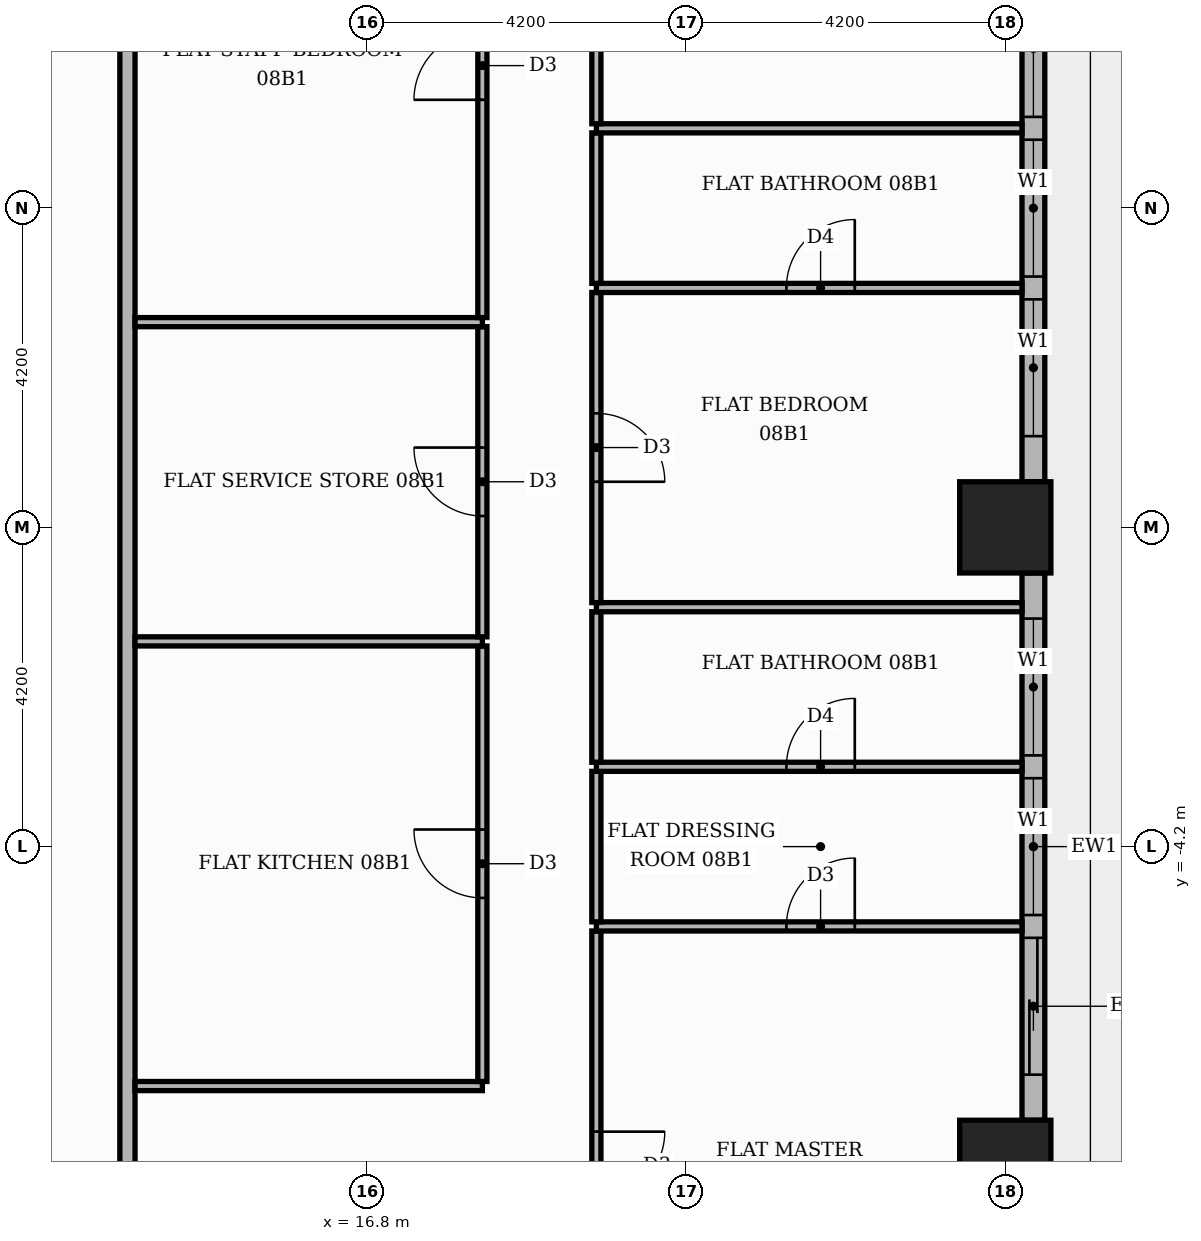
"""IFC4 building model, lengths in metres.
Left out: names, types, materials, properties, quantities, classifications, styles, units other than length and angle.
Written with IfcOpenShell. Run it as: python <this file> out.ifc"""

import sys

from ifc_helpers import new_model, si_unit, direction, frame, frame_2d, origin, origin_2d, place, context, subcontext, project, spatial, rectangle, extrude, element, fill, save


model = new_model("IFC4")
c1 = context("Model", 3, precision=1e-05, world=origin(), true_north=direction((0.0, 1.0)))
c2 = subcontext(c1, "Body", "Model", "MODEL_VIEW")
j1 = project(units=[si_unit("LENGTHUNIT", "METRE"), si_unit("PLANEANGLEUNIT", "RADIAN")], contexts=[c1])
p1 = place(None, origin())
s1 = spatial("IfcSite", under=j1, at=p1, CompositionType="ELEMENT")
p2 = place(p1, origin())
s2 = spatial("IfcBuilding", under=s1, at=p2, CompositionType="ELEMENT")
p3 = place(p2, frame((0.0, 0.0, 38.7)))
s3 = spatial("IfcBuildingStorey", under=s2, at=p3, CompositionType="ELEMENT", Elevation=38.7)
for number, where, z_axis, x_axis in (
    (1, (25.2, 0.0, 0.0), (0.0, 0.0, 1.0), (1.0, 0.0, 0.0)),
    (2, (25.2, -8.4, 0.0), (0.0, 0.0, 1.0), (1.0, 0.0, 0.0)),
):
    element("IfcColumn", number, at=place(p3, frame(where, z_axis=z_axis, x_axis=x_axis)), inside=s3, PredefinedType="COLUMN", context=c2, shape_type="SweptSolid", body=[
        extrude(rectangle(XDim=1.2, YDim=1.2, at=origin_2d()), origin(), (0.0, 0.0, 1.0), 3.9),
    ])
p4 = place(p3, frame((25.57, -7.8, 0.0), z_axis=(0.0, 0.0, 1.0), x_axis=(0.0, 1.0, 0.0)))
e3 = element("IfcWall", 3, at=p4, inside=s3, PredefinedType="STANDARD", context=c2, shape_type="SweptSolid", body=[
    extrude(rectangle(XDim=7.2, YDim=0.3, at=frame_2d((3.6, 0.0))), origin(), (0.0, 0.0, 1.0), 3.48),
])
p5 = place(p4, frame((0.6, 0.0, 0.0)))
e4 = element("IfcOpeningElement", 4, at=p5, cuts=e3, PredefinedType="OPENING", context=c2, shape_type="SweptSolid", body=[
    extrude(rectangle(XDim=1.8, YDim=2.4, at=frame_2d((0.9, 1.2))), frame((0.0, 0.16, 0.0), z_axis=(0.0, -1.0, 0.0), x_axis=(1.0, 0.0, 0.0)), (0.0, 0.0, 1.0), 0.32),
])
p6 = place(p4, frame((2.7, 0.0, 0.9)))
e5 = element("IfcOpeningElement", 5, at=p6, cuts=e3, PredefinedType="OPENING", context=c2, shape_type="SweptSolid", body=[
    extrude(rectangle(XDim=1.8, YDim=2.1, at=frame_2d((0.9, 1.05))), frame((0.0, 0.16, 0.0), z_axis=(0.0, -1.0, 0.0), x_axis=(1.0, 0.0, 0.0)), (0.0, 0.0, 1.0), 0.32),
])
p7 = place(p4, frame((4.8, 0.0, 0.9)))
e6 = element("IfcOpeningElement", 6, at=p7, cuts=e3, PredefinedType="OPENING", context=c2, shape_type="SweptSolid", body=[
    extrude(rectangle(XDim=1.8, YDim=2.1, at=frame_2d((0.9, 1.05))), frame((0.0, 0.16, 0.0), z_axis=(0.0, -1.0, 0.0), x_axis=(1.0, 0.0, 0.0)), (0.0, 0.0, 1.0), 0.32),
])
p8 = place(p3, frame((25.57, 0.6, 0.0), z_axis=(0.0, 0.0, 1.0), x_axis=(0.0, 1.0, 0.0)))
e7 = element("IfcWall", 7, at=p8, inside=s3, PredefinedType="STANDARD", context=c2, shape_type="SweptSolid", body=[
    extrude(rectangle(XDim=7.2, YDim=0.3, at=frame_2d((3.6, 0.0))), origin(), (0.0, 0.0, 1.0), 3.48),
])
p9 = place(p8, frame((0.6, 0.0, 0.9)))
e8 = element("IfcOpeningElement", 8, at=p9, cuts=e7, PredefinedType="OPENING", context=c2, shape_type="SweptSolid", body=[
    extrude(rectangle(XDim=1.8, YDim=2.1, at=frame_2d((0.9, 1.05))), frame((0.0, 0.16, 0.0), z_axis=(0.0, -1.0, 0.0), x_axis=(1.0, 0.0, 0.0)), (0.0, 0.0, 1.0), 0.32),
])
p10 = place(p8, frame((2.7, 0.0, 0.9)))
e9 = element("IfcOpeningElement", 9, at=p10, cuts=e7, PredefinedType="OPENING", context=c2, shape_type="SweptSolid", body=[
    extrude(rectangle(XDim=1.8, YDim=2.1, at=frame_2d((0.9, 1.05))), frame((0.0, 0.16, 0.0), z_axis=(0.0, -1.0, 0.0), x_axis=(1.0, 0.0, 0.0)), (0.0, 0.0, 1.0), 0.32),
])
p11 = place(p8, frame((4.8, 0.0, 0.9)))
e10 = element("IfcOpeningElement", 10, at=p11, cuts=e7, PredefinedType="OPENING", context=c2, shape_type="SweptSolid", body=[
    extrude(rectangle(XDim=1.8, YDim=2.1, at=frame_2d((0.9, 1.05))), frame((0.0, 0.16, 0.0), z_axis=(0.0, -1.0, 0.0), x_axis=(1.0, 0.0, 0.0)), (0.0, 0.0, 1.0), 0.32),
])
p12 = place(p3, frame((13.65, -13.55, 0.0), z_axis=(0.0, 0.0, 1.0), x_axis=(0.0, 1.0, 0.0)))
e11 = element("IfcWall", 11, at=p12, inside=s3, PredefinedType="PARTITIONING", context=c2, shape_type="SweptSolid", body=[
    extrude(rectangle(XDim=27.1, YDim=0.2, at=frame_2d((13.55, 0.0))), origin(), (0.0, 0.0, 1.0), 3.48),
])
p13 = place(p12, frame((2.5, 0.0, 0.0)))
e12 = element("IfcOpeningElement", 12, at=p13, cuts=e11, PredefinedType="OPENING", context=c2, shape_type="SweptSolid", body=[
    extrude(rectangle(XDim=1.1, YDim=2.4, at=frame_2d((0.55, 1.2))), frame((0.0, 0.11, 0.0), z_axis=(0.0, -1.0, 0.0), x_axis=(1.0, 0.0, 0.0)), (0.0, 0.0, 1.0), 0.22),
])
p14 = place(p3, frame((19.82, -11.49, 0.0), z_axis=(0.0, 0.0, 1.0), x_axis=(0.0, 1.0, 0.0)))
e13 = element("IfcWall", 13, at=p14, inside=s3, PredefinedType="PARTITIONING", context=c2, shape_type="SweptSolid", body=[
    extrude(rectangle(XDim=6.18, YDim=0.12, at=frame_2d((3.09, 0.0))), origin(), (0.0, 0.0, 1.0), 3.48),
])
p15 = place(p14, frame((2.64, 0.0, 0.0)))
e14 = element("IfcOpeningElement", 14, at=p15, cuts=e13, PredefinedType="OPENING", context=c2, shape_type="SweptSolid", body=[
    extrude(rectangle(XDim=0.9, YDim=2.1, at=frame_2d((0.45, 1.05))), frame((0.0, 0.07, 0.0), z_axis=(0.0, -1.0, 0.0), x_axis=(1.0, 0.0, 0.0)), (0.0, 0.0, 1.0), 0.14),
])
p16 = place(p3, frame((13.75, -7.35, 0.0), z_axis=(0.0, 0.0, 1.0), x_axis=(1.0, 0.0, 0.0)))
e15 = element("IfcWall", 15, at=p16, inside=s3, PredefinedType="PARTITIONING", context=c2, shape_type="SweptSolid", body=[
    extrude(rectangle(XDim=4.57, YDim=0.12, at=frame_2d((2.285, 0.0))), origin(), (0.0, 0.0, 1.0), 3.48),
])
p17 = place(p3, frame((18.32, -7.29, 0.0), z_axis=(0.0, 0.0, 1.0), x_axis=(0.0, 1.0, 0.0)))
e16 = element("IfcWall", 16, at=p17, inside=s3, PredefinedType="PARTITIONING", context=c2, shape_type="SweptSolid", body=[
    extrude(rectangle(XDim=5.73, YDim=0.12, at=frame_2d((2.865, 0.0))), origin(), (0.0, 0.0, 1.0), 3.48),
])
p18 = place(p17, frame((2.415, 0.0, 0.0)))
e17 = element("IfcOpeningElement", 17, at=p18, cuts=e16, PredefinedType="OPENING", context=c2, shape_type="SweptSolid", body=[
    extrude(rectangle(XDim=0.9, YDim=2.1, at=frame_2d((0.45, 1.05))), frame((0.0, 0.07, 0.0), z_axis=(0.0, -1.0, 0.0), x_axis=(1.0, 0.0, 0.0)), (0.0, 0.0, 1.0), 0.14),
])
p19 = place(p3, frame((19.82, -5.25, 0.0), z_axis=(0.0, 0.0, 1.0), x_axis=(1.0, 0.0, 0.0)))
e18 = element("IfcWall", 18, at=p19, inside=s3, PredefinedType="PARTITIONING", context=c2, shape_type="SweptSolid", body=[
    extrude(rectangle(XDim=5.6, YDim=0.12, at=frame_2d((2.8, 0.0))), origin(), (0.0, 0.0, 1.0), 3.48),
])
p20 = place(p19, frame((2.5, 0.0, 0.0)))
e19 = element("IfcOpeningElement", 19, at=p20, cuts=e18, PredefinedType="OPENING", context=c2, shape_type="SweptSolid", body=[
    extrude(rectangle(XDim=0.9, YDim=2.1, at=frame_2d((0.45, 1.05))), frame((0.0, 0.07, 0.0), z_axis=(0.0, -1.0, 0.0), x_axis=(1.0, 0.0, 0.0)), (0.0, 0.0, 1.0), 0.14),
])
p21 = place(p3, frame((19.82, -5.19, 0.0), z_axis=(0.0, 0.0, 1.0), x_axis=(0.0, 1.0, 0.0)))
e20 = element("IfcWall", 20, at=p21, inside=s3, PredefinedType="PARTITIONING", context=c2, shape_type="SweptSolid", body=[
    extrude(rectangle(XDim=1.98, YDim=0.12, at=frame_2d((0.99, 0.0))), origin(), (0.0, 0.0, 1.0), 3.48),
])
p22 = place(p3, frame((19.82, -3.15, 0.0), z_axis=(0.0, 0.0, 1.0), x_axis=(1.0, 0.0, 0.0)))
e21 = element("IfcWall", 21, at=p22, inside=s3, PredefinedType="PARTITIONING", context=c2, shape_type="SweptSolid", body=[
    extrude(rectangle(XDim=5.6, YDim=0.12, at=frame_2d((2.8, 0.0))), origin(), (0.0, 0.0, 1.0), 3.48),
])
p23 = place(p22, frame((2.5, 0.0, 0.0)))
e22 = element("IfcOpeningElement", 22, at=p23, cuts=e21, PredefinedType="OPENING", context=c2, shape_type="SweptSolid", body=[
    extrude(rectangle(XDim=0.9, YDim=2.1, at=frame_2d((0.45, 1.05))), frame((0.0, 0.07, 0.0), z_axis=(0.0, -1.0, 0.0), x_axis=(1.0, 0.0, 0.0)), (0.0, 0.0, 1.0), 0.14),
])
p24 = place(p3, frame((19.82, -3.09, 0.0), z_axis=(0.0, 0.0, 1.0), x_axis=(0.0, 1.0, 0.0)))
e23 = element("IfcWall", 23, at=p24, inside=s3, PredefinedType="PARTITIONING", context=c2, shape_type="SweptSolid", body=[
    extrude(rectangle(XDim=1.98, YDim=0.12, at=frame_2d((0.99, 0.0))), origin(), (0.0, 0.0, 1.0), 3.48),
])
p25 = place(p3, frame((13.75, -1.5, 0.0), z_axis=(0.0, 0.0, 1.0), x_axis=(1.0, 0.0, 0.0)))
e24 = element("IfcWall", 24, at=p25, inside=s3, PredefinedType="PARTITIONING", context=c2, shape_type="SweptSolid", body=[
    extrude(rectangle(XDim=4.57, YDim=0.12, at=frame_2d((2.285, 0.0))), origin(), (0.0, 0.0, 1.0), 3.48),
])
p26 = place(p3, frame((18.32, -1.44, 0.0), z_axis=(0.0, 0.0, 1.0), x_axis=(0.0, 1.0, 0.0)))
e25 = element("IfcWall", 25, at=p26, inside=s3, PredefinedType="PARTITIONING", context=c2, shape_type="SweptSolid", body=[
    extrude(rectangle(XDim=4.08, YDim=0.12, at=frame_2d((2.04, 0.0))), origin(), (0.0, 0.0, 1.0), 3.48),
])
p27 = place(p26, frame((1.59, 0.0, 0.0)))
e26 = element("IfcOpeningElement", 26, at=p27, cuts=e25, PredefinedType="OPENING", context=c2, shape_type="SweptSolid", body=[
    extrude(rectangle(XDim=0.9, YDim=2.1, at=frame_2d((0.45, 1.05))), frame((0.0, 0.07, 0.0), z_axis=(0.0, -1.0, 0.0), x_axis=(1.0, 0.0, 0.0)), (0.0, 0.0, 1.0), 0.14),
])
p28 = place(p3, frame((19.82, -1.05, 0.0), z_axis=(0.0, 0.0, 1.0), x_axis=(1.0, 0.0, 0.0)))
e27 = element("IfcWall", 27, at=p28, inside=s3, PredefinedType="PARTITIONING", context=c2, shape_type="SweptSolid", body=[
    extrude(rectangle(XDim=5.6, YDim=0.12, at=frame_2d((2.8, 0.0))), origin(), (0.0, 0.0, 1.0), 3.48),
])
p29 = place(p3, frame((19.82, -0.99, 0.0), z_axis=(0.0, 0.0, 1.0), x_axis=(0.0, 1.0, 0.0)))
e28 = element("IfcWall", 28, at=p29, inside=s3, PredefinedType="PARTITIONING", context=c2, shape_type="SweptSolid", body=[
    extrude(rectangle(XDim=4.08, YDim=0.12, at=frame_2d((2.04, 0.0))), origin(), (0.0, 0.0, 1.0), 3.48),
])
p30 = place(p29, frame((1.59, 0.0, 0.0)))
e29 = element("IfcOpeningElement", 29, at=p30, cuts=e28, PredefinedType="OPENING", context=c2, shape_type="SweptSolid", body=[
    extrude(rectangle(XDim=0.9, YDim=2.1, at=frame_2d((0.45, 1.05))), frame((0.0, 0.07, 0.0), z_axis=(0.0, -1.0, 0.0), x_axis=(1.0, 0.0, 0.0)), (0.0, 0.0, 1.0), 0.14),
])
p31 = place(p3, frame((13.75, 2.7, 0.0), z_axis=(0.0, 0.0, 1.0), x_axis=(1.0, 0.0, 0.0)))
e30 = element("IfcWall", 30, at=p31, inside=s3, PredefinedType="PARTITIONING", context=c2, shape_type="SweptSolid", body=[
    extrude(rectangle(XDim=4.57, YDim=0.12, at=frame_2d((2.285, 0.0))), origin(), (0.0, 0.0, 1.0), 3.48),
])
p32 = place(p3, frame((18.32, 2.76, 0.0), z_axis=(0.0, 0.0, 1.0), x_axis=(0.0, 1.0, 0.0)))
e31 = element("IfcWall", 31, at=p32, inside=s3, PredefinedType="PARTITIONING", context=c2, shape_type="SweptSolid", body=[
    extrude(rectangle(XDim=6.63, YDim=0.12, at=frame_2d((3.315, 0.0))), origin(), (0.0, 0.0, 1.0), 3.48),
])
p33 = place(p32, frame((2.865, 0.0, 0.0)))
e32 = element("IfcOpeningElement", 32, at=p33, cuts=e31, PredefinedType="OPENING", context=c2, shape_type="SweptSolid", body=[
    extrude(rectangle(XDim=0.9, YDim=2.1, at=frame_2d((0.45, 1.05))), frame((0.0, 0.07, 0.0), z_axis=(0.0, -1.0, 0.0), x_axis=(1.0, 0.0, 0.0)), (0.0, 0.0, 1.0), 0.14),
])
p34 = place(p3, frame((19.82, 3.15, 0.0), z_axis=(0.0, 0.0, 1.0), x_axis=(1.0, 0.0, 0.0)))
e33 = element("IfcWall", 33, at=p34, inside=s3, PredefinedType="PARTITIONING", context=c2, shape_type="SweptSolid", body=[
    extrude(rectangle(XDim=5.6, YDim=0.12, at=frame_2d((2.8, 0.0))), origin(), (0.0, 0.0, 1.0), 3.48),
])
p35 = place(p34, frame((2.5, 0.0, 0.0)))
e34 = element("IfcOpeningElement", 34, at=p35, cuts=e33, PredefinedType="OPENING", context=c2, shape_type="SweptSolid", body=[
    extrude(rectangle(XDim=0.9, YDim=2.1, at=frame_2d((0.45, 1.05))), frame((0.0, 0.07, 0.0), z_axis=(0.0, -1.0, 0.0), x_axis=(1.0, 0.0, 0.0)), (0.0, 0.0, 1.0), 0.14),
])
p36 = place(p3, frame((19.82, 3.21, 0.0), z_axis=(0.0, 0.0, 1.0), x_axis=(0.0, 1.0, 0.0)))
e35 = element("IfcWall", 35, at=p36, inside=s3, PredefinedType="PARTITIONING", context=c2, shape_type="SweptSolid", body=[
    extrude(rectangle(XDim=1.98, YDim=0.12, at=frame_2d((0.99, 0.0))), origin(), (0.0, 0.0, 1.0), 3.48),
])
p37 = place(p3, frame((19.82, 5.25, 0.0), z_axis=(0.0, 0.0, 1.0), x_axis=(1.0, 0.0, 0.0)))
e36 = element("IfcWall", 36, at=p37, inside=s3, PredefinedType="PARTITIONING", context=c2, shape_type="SweptSolid", body=[
    extrude(rectangle(XDim=5.6, YDim=0.12, at=frame_2d((2.8, 0.0))), origin(), (0.0, 0.0, 1.0), 3.48),
])
p38 = place(p3, frame((19.82, 5.31, 0.0), z_axis=(0.0, 0.0, 1.0), x_axis=(0.0, 1.0, 0.0)))
e37 = element("IfcWall", 37, at=p38, inside=s3, PredefinedType="PARTITIONING", context=c2, shape_type="SweptSolid", body=[
    extrude(rectangle(XDim=6.18, YDim=0.12, at=frame_2d((3.09, 0.0))), origin(), (0.0, 0.0, 1.0), 3.48),
])
p39 = place(p38, frame((2.64, 0.0, 0.0)))
e38 = element("IfcOpeningElement", 38, at=p39, cuts=e37, PredefinedType="OPENING", context=c2, shape_type="SweptSolid", body=[
    extrude(rectangle(XDim=0.9, YDim=2.1, at=frame_2d((0.45, 1.05))), frame((0.0, 0.07, 0.0), z_axis=(0.0, -1.0, 0.0), x_axis=(1.0, 0.0, 0.0)), (0.0, 0.0, 1.0), 0.14),
])
p40 = place(p5, origin())
e39 = element("IfcDoor", 39, at=p40, inside=s3, OperationType="SLIDING_TO_LEFT", PredefinedType="DOOR", context=c2, shape_type="SweptSolid", body=[
    extrude(rectangle(XDim=1.8, YDim=2.4, at=frame_2d((0.9, 1.2))), frame((0.0, 0.025, 0.0), z_axis=(0.0, -1.0, 0.0), x_axis=(1.0, 0.0, 0.0)), (0.0, 0.0, 1.0), 0.05),
])
fill(e4, e39)
p41 = place(p6, origin())
e40 = element("IfcWindow", 40, at=p41, inside=s3, PartitioningType="SINGLE_PANEL", PredefinedType="WINDOW", context=c2, shape_type="SweptSolid", body=[
    extrude(rectangle(XDim=1.8, YDim=2.1, at=frame_2d((0.9, 1.05))), frame((0.0, 0.03, 0.0), z_axis=(0.0, -1.0, 0.0), x_axis=(1.0, 0.0, 0.0)), (0.0, 0.0, 1.0), 0.06),
])
fill(e5, e40)
p42 = place(p7, origin())
e41 = element("IfcWindow", 41, at=p42, inside=s3, PartitioningType="SINGLE_PANEL", PredefinedType="WINDOW", context=c2, shape_type="SweptSolid", body=[
    extrude(rectangle(XDim=1.8, YDim=2.1, at=frame_2d((0.9, 1.05))), frame((0.0, 0.03, 0.0), z_axis=(0.0, -1.0, 0.0), x_axis=(1.0, 0.0, 0.0)), (0.0, 0.0, 1.0), 0.06),
])
fill(e6, e41)
p43 = place(p9, origin())
e42 = element("IfcWindow", 42, at=p43, inside=s3, PartitioningType="SINGLE_PANEL", PredefinedType="WINDOW", context=c2, shape_type="SweptSolid", body=[
    extrude(rectangle(XDim=1.8, YDim=2.1, at=frame_2d((0.9, 1.05))), frame((0.0, 0.03, 0.0), z_axis=(0.0, -1.0, 0.0), x_axis=(1.0, 0.0, 0.0)), (0.0, 0.0, 1.0), 0.06),
])
fill(e8, e42)
p44 = place(p10, origin())
e43 = element("IfcWindow", 43, at=p44, inside=s3, PartitioningType="SINGLE_PANEL", PredefinedType="WINDOW", context=c2, shape_type="SweptSolid", body=[
    extrude(rectangle(XDim=1.8, YDim=2.1, at=frame_2d((0.9, 1.05))), frame((0.0, 0.03, 0.0), z_axis=(0.0, -1.0, 0.0), x_axis=(1.0, 0.0, 0.0)), (0.0, 0.0, 1.0), 0.06),
])
fill(e9, e43)
p45 = place(p11, origin())
e44 = element("IfcWindow", 44, at=p45, inside=s3, PartitioningType="SINGLE_PANEL", PredefinedType="WINDOW", context=c2, shape_type="SweptSolid", body=[
    extrude(rectangle(XDim=1.8, YDim=2.1, at=frame_2d((0.9, 1.05))), frame((0.0, 0.03, 0.0), z_axis=(0.0, -1.0, 0.0), x_axis=(1.0, 0.0, 0.0)), (0.0, 0.0, 1.0), 0.06),
])
fill(e10, e44)
p46 = place(p18, origin())
e45 = element("IfcDoor", 45, at=p46, inside=s3, OperationType="SINGLE_SWING_RIGHT", PredefinedType="DOOR", context=c2, shape_type="SweptSolid", body=[
    extrude(rectangle(XDim=0.9, YDim=2.1, at=frame_2d((0.45, 1.05))), frame((0.0, 0.025, 0.0), z_axis=(0.0, -1.0, 0.0), x_axis=(1.0, 0.0, 0.0)), (0.0, 0.0, 1.0), 0.05),
])
fill(e17, e45)
p47 = place(p27, origin())
e46 = element("IfcDoor", 46, at=p47, inside=s3, OperationType="SINGLE_SWING_RIGHT", PredefinedType="DOOR", context=c2, shape_type="SweptSolid", body=[
    extrude(rectangle(XDim=0.9, YDim=2.1, at=frame_2d((0.45, 1.05))), frame((0.0, 0.025, 0.0), z_axis=(0.0, -1.0, 0.0), x_axis=(1.0, 0.0, 0.0)), (0.0, 0.0, 1.0), 0.05),
])
fill(e26, e46)
p48 = place(p33, origin())
e47 = element("IfcDoor", 47, at=p48, inside=s3, OperationType="SINGLE_SWING_LEFT", PredefinedType="DOOR", context=c2, shape_type="SweptSolid", body=[
    extrude(rectangle(XDim=0.9, YDim=2.1, at=frame_2d((0.45, 1.05))), frame((0.0, 0.025, 0.0), z_axis=(0.0, -1.0, 0.0), x_axis=(1.0, 0.0, 0.0)), (0.0, 0.0, 1.0), 0.05),
])
fill(e32, e47)
p49 = place(p15, frame((0.9, 0.0, 0.0), z_axis=(0.0, 0.0, 1.0), x_axis=(-1.0, 0.0, 0.0)))
e48 = element("IfcDoor", 48, at=p49, inside=s3, OperationType="SINGLE_SWING_RIGHT", PredefinedType="DOOR", context=c2, shape_type="SweptSolid", body=[
    extrude(rectangle(XDim=0.9, YDim=2.1, at=frame_2d((0.45, 1.05))), frame((0.0, 0.025, 0.0), z_axis=(0.0, -1.0, 0.0), x_axis=(1.0, 0.0, 0.0)), (0.0, 0.0, 1.0), 0.05),
])
fill(e14, e48)
p50 = place(p20, origin())
e49 = element("IfcDoor", 49, at=p50, inside=s3, OperationType="SINGLE_SWING_RIGHT", PredefinedType="DOOR", context=c2, shape_type="SweptSolid", body=[
    extrude(rectangle(XDim=0.9, YDim=2.1, at=frame_2d((0.45, 1.05))), frame((0.0, 0.025, 0.0), z_axis=(0.0, -1.0, 0.0), x_axis=(1.0, 0.0, 0.0)), (0.0, 0.0, 1.0), 0.05),
])
fill(e19, e49)
p51 = place(p23, origin())
e50 = element("IfcDoor", 50, at=p51, inside=s3, OperationType="SINGLE_SWING_RIGHT", PredefinedType="DOOR", context=c2, shape_type="SweptSolid", body=[
    extrude(rectangle(XDim=0.9, YDim=2.1, at=frame_2d((0.45, 1.05))), frame((0.0, 0.025, 0.0), z_axis=(0.0, -1.0, 0.0), x_axis=(1.0, 0.0, 0.0)), (0.0, 0.0, 1.0), 0.05),
])
fill(e22, e50)
p52 = place(p30, frame((0.9, 0.0, 0.0), z_axis=(0.0, 0.0, 1.0), x_axis=(-1.0, 0.0, 0.0)))
e51 = element("IfcDoor", 51, at=p52, inside=s3, OperationType="SINGLE_SWING_LEFT", PredefinedType="DOOR", context=c2, shape_type="SweptSolid", body=[
    extrude(rectangle(XDim=0.9, YDim=2.1, at=frame_2d((0.45, 1.05))), frame((0.0, 0.025, 0.0), z_axis=(0.0, -1.0, 0.0), x_axis=(1.0, 0.0, 0.0)), (0.0, 0.0, 1.0), 0.05),
])
fill(e29, e51)
p53 = place(p35, origin())
e52 = element("IfcDoor", 52, at=p53, inside=s3, OperationType="SINGLE_SWING_RIGHT", PredefinedType="DOOR", context=c2, shape_type="SweptSolid", body=[
    extrude(rectangle(XDim=0.9, YDim=2.1, at=frame_2d((0.45, 1.05))), frame((0.0, 0.025, 0.0), z_axis=(0.0, -1.0, 0.0), x_axis=(1.0, 0.0, 0.0)), (0.0, 0.0, 1.0), 0.05),
])
fill(e34, e52)
save(model, sys.argv[1])
